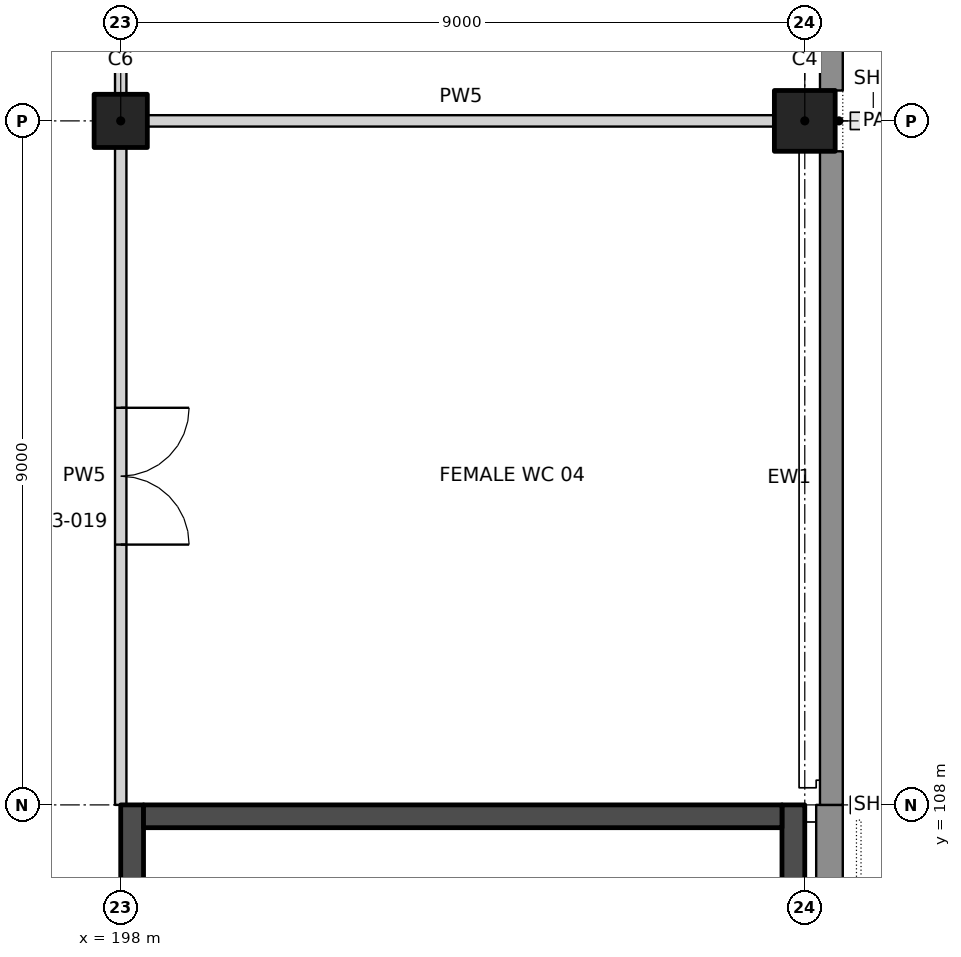
"""IFC4 building model, lengths in metres.
Left out: names, types, materials, properties, quantities, classifications, styles, units other than length and angle.
Written with IfcOpenShell. Run it as: python <this file> out.ifc"""

import sys

from ifc_helpers import new_model, si_unit, direction, frame, frame_2d, origin, origin_2d, place, context, subcontext, project, spatial, rectangle, extrude, element, fill, save


model = new_model("IFC4")
c1 = context("Model", 3, precision=1e-05, world=origin(), true_north=direction((0.0, 1.0)))
c2 = subcontext(c1, "Body", "Model", "MODEL_VIEW")
j1 = project(units=[si_unit("LENGTHUNIT", "METRE"), si_unit("PLANEANGLEUNIT", "RADIAN")], contexts=[c1])
p1 = place(None, origin())
s1 = spatial("IfcSite", under=j1, at=p1, CompositionType="ELEMENT")
p2 = place(p1, origin())
s2 = spatial("IfcBuilding", under=s1, at=p2, CompositionType="ELEMENT")
p3 = place(p2, frame((0.0, 0.0, 22.0)))
s3 = spatial("IfcBuildingStorey", under=s2, at=p3, CompositionType="ELEMENT", Elevation=22.0)
p4 = place(p3, frame((207.0, 117.0, 0.0), z_axis=(0.0, 0.0, 1.0), x_axis=(1.0, 0.0, 0.0)))
e1 = element("IfcColumn", 1, at=p4, inside=s3, PredefinedType="COLUMN", context=c2, shape_type="SweptSolid", body=[
    extrude(rectangle(XDim=0.8, YDim=0.8, at=origin_2d()), origin(), (0.0, 0.0, 1.0), 6.0),
])
p5 = place(p3, frame((198.0, 117.0, 0.0), z_axis=(0.0, 0.0, 1.0), x_axis=(1.0, 0.0, 0.0)))
e2 = element("IfcColumn", 2, at=p5, inside=s3, PredefinedType="COLUMN", context=c2, shape_type="SweptSolid", body=[
    extrude(rectangle(XDim=0.7, YDim=0.7, at=origin_2d()), origin(), (0.0, 0.0, 1.0), 6.0),
])
p6 = place(p3, frame((198.35, 117.0, 0.0), z_axis=(0.0, 0.0, 1.0), x_axis=(1.0, 0.0, 0.0)))
e3 = element("IfcWall", 3, at=p6, inside=s3, PredefinedType="PARTITIONING", context=c2, shape_type="SweptSolid", body=[
    extrude(rectangle(XDim=8.25, YDim=0.15, at=frame_2d((4.125, 0.0))), origin(), (0.0, 0.0, 1.0), 4.8),
])
p7 = place(p3, frame((198.0, 108.0, 0.0), z_axis=(0.0, 0.0, 1.0), x_axis=(0.0, 1.0, 0.0)))
e4 = element("IfcWall", 4, at=p7, inside=s3, PredefinedType="PARTITIONING", context=c2, shape_type="SweptSolid", body=[
    extrude(rectangle(XDim=8.65, YDim=0.15, at=frame_2d((4.325, 0.0))), origin(), (0.0, 0.0, 1.0), 4.7),
])
p8 = place(p7, frame((3.425, 0.0, 0.0)))
e5 = element("IfcOpeningElement", 5, at=p8, cuts=e4, PredefinedType="OPENING", context=c2, shape_type="SweptSolid", body=[
    extrude(rectangle(XDim=1.8, YDim=2.1, at=frame_2d((0.9, 1.05))), frame((0.0, 0.085, 0.0), z_axis=(0.0, -1.0, 0.0), x_axis=(1.0, 0.0, 0.0)), (0.0, 0.0, 1.0), 0.17),
])
p9 = place(p3, frame((198.0, 117.35, 0.0), z_axis=(0.0, 0.0, 1.0), x_axis=(0.0, 1.0, 0.0)))
e6 = element("IfcWall", 6, at=p9, inside=s3, PredefinedType="PARTITIONING", context=c2, shape_type="SweptSolid", body=[
    extrude(rectangle(XDim=8.3, YDim=0.15, at=frame_2d((4.15, 0.0))), origin(), (0.0, 0.0, 1.0), 4.8),
])
p10 = place(p9, frame((3.25, 0.0, 0.0)))
e7 = element("IfcOpeningElement", 7, at=p10, cuts=e6, PredefinedType="OPENING", context=c2, shape_type="SweptSolid", body=[
    extrude(rectangle(XDim=1.8, YDim=2.1, at=frame_2d((0.9, 1.05))), frame((0.0, 0.085, 0.0), z_axis=(0.0, -1.0, 0.0), x_axis=(1.0, 0.0, 0.0)), (0.0, 0.0, 1.0), 0.17),
])
p11 = place(p3, frame((207.325, 99.0, 0.0), z_axis=(0.0, 0.0, 1.0), x_axis=(0.0, 1.0, 0.0)))
e8 = element("IfcWall", 8, at=p11, inside=s3, PredefinedType="SOLIDWALL", context=c2, shape_type="SweptSolid", body=[
    extrude(rectangle(XDim=9.0, YDim=0.35, at=frame_2d((4.5, 0.0))), origin(), (0.0, 0.0, 1.0), 6.0),
])
p12 = place(p3, frame((207.35, 108.0, 0.0), z_axis=(0.0, 0.0, 1.0), x_axis=(0.0, 1.0, 0.0)))
e9 = element("IfcWall", 9, at=p12, inside=s3, PredefinedType="SOLIDWALL", context=c2, shape_type="SweptSolid", body=[
    extrude(rectangle(XDim=8.6, YDim=0.3, at=frame_2d((4.3, 0.0))), origin(), (0.0, 0.0, 1.0), 6.0),
])
p13 = place(p3, frame((207.35, 117.4, 0.0), z_axis=(0.0, 0.0, 1.0), x_axis=(0.0, 1.0, 0.0)))
e10 = element("IfcWall", 10, at=p13, inside=s3, PredefinedType="SOLIDWALL", context=c2, shape_type="SweptSolid", body=[
    extrude(rectangle(XDim=8.2, YDim=0.3, at=frame_2d((4.1, 0.0))), origin(), (0.0, 0.0, 1.0), 6.0),
])
p14 = place(p3, frame((198.15, 108.0, 0.0), z_axis=(0.0, 0.0, 1.0), x_axis=(0.0, -1.0, 0.0)))
e11 = element("IfcWall", 11, at=p14, inside=s3, PredefinedType="SHEAR", context=c2, shape_type="SweptSolid", body=[
    extrude(rectangle(XDim=18.0, YDim=0.3, at=frame_2d((9.0, 0.0))), origin(), (0.0, 0.0, 1.0), 6.0),
])
p15 = place(p14, frame((8.6, 0.0, 0.0)))
e12 = element("IfcOpeningElement", 12, at=p15, cuts=e11, PredefinedType="OPENING", context=c2, shape_type="SweptSolid", body=[
    extrude(rectangle(XDim=1.2, YDim=2.1, at=frame_2d((0.6, 1.05))), frame((0.0, 0.16, 0.0), z_axis=(0.0, -1.0, 0.0), x_axis=(1.0, 0.0, 0.0)), (0.0, 0.0, 1.0), 0.32),
])
p16 = place(p3, frame((206.85, 108.0, 0.0), z_axis=(0.0, 0.0, 1.0), x_axis=(0.0, -1.0, 0.0)))
e13 = element("IfcWall", 13, at=p16, inside=s3, PredefinedType="SHEAR", context=c2, shape_type="SweptSolid", body=[
    extrude(rectangle(XDim=18.0, YDim=0.3, at=frame_2d((9.0, 0.0))), origin(), (0.0, 0.0, 1.0), 6.0),
])
p17 = place(p3, frame((198.3, 107.85, 0.0), z_axis=(0.0, 0.0, 1.0), x_axis=(1.0, 0.0, 0.0)))
e14 = element("IfcWall", 14, at=p17, inside=s3, PredefinedType="SHEAR", context=c2, shape_type="SweptSolid", body=[
    extrude(rectangle(XDim=8.4, YDim=0.3, at=frame_2d((4.2, 0.0))), origin(), (0.0, 0.0, 1.0), 6.0),
])
p18 = place(p8, frame((1.8, 0.0, 0.0), z_axis=(0.0, 0.0, 1.0), x_axis=(-1.0, 0.0, 0.0)))
e15 = element("IfcDoor", 15, at=p18, inside=s3, OperationType="DOUBLE_DOOR_DOUBLE_SWING", PredefinedType="DOOR", context=c2, shape_type="SweptSolid", body=[
    extrude(rectangle(XDim=1.8, YDim=2.1, at=frame_2d((0.9, 1.05))), frame((0.0, 0.025, 0.0), z_axis=(0.0, -1.0, 0.0), x_axis=(1.0, 0.0, 0.0)), (0.0, 0.0, 1.0), 0.05),
])
fill(e5, e15)
save(model, sys.argv[1])
